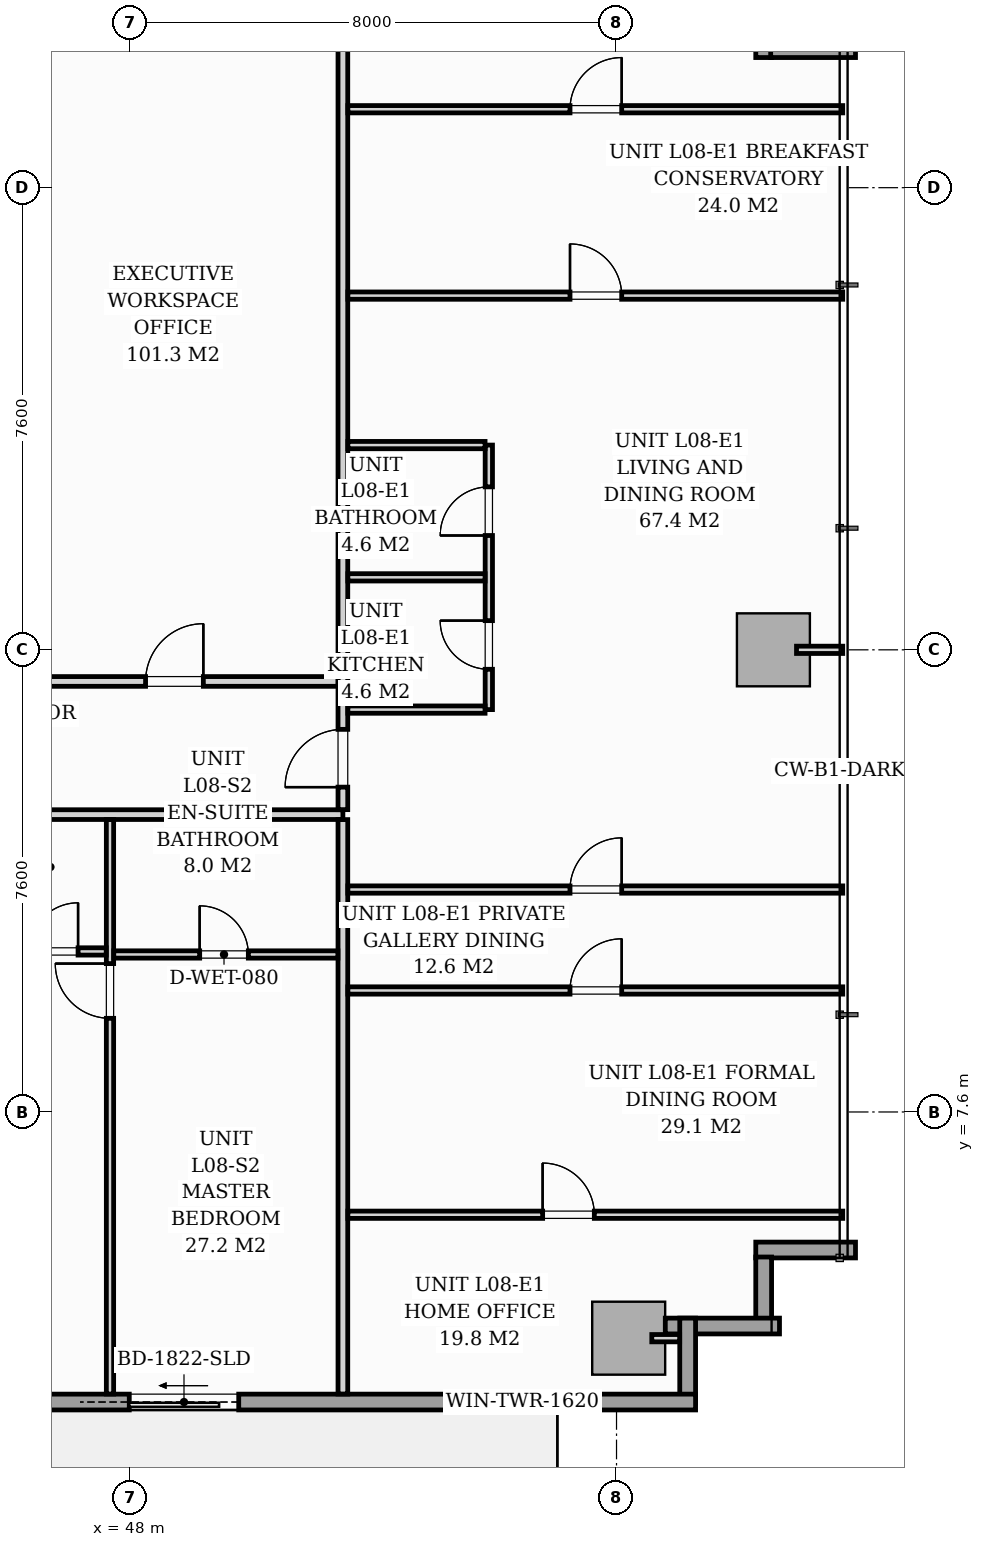
"""IFC4 building model, lengths in metres.
Left out: names, types, materials, properties, quantities, classifications, styles, units other than length and angle.
Written with IfcOpenShell. Run it as: python <this file> out.ifc"""

import sys

from ifc_helpers import new_model, si_unit, direction, frame, frame_2d, origin, origin_2d, place, context, subcontext, project, spatial, rectangle, extrude, source, transform, mapped, element, fill, save


model = new_model("IFC4")
c1 = context("Model", 3, precision=1e-05, world=origin(), true_north=direction((0.0, 1.0)))
c2 = subcontext(c1, "Body", "Model", "MODEL_VIEW")
j1 = project(units=[si_unit("LENGTHUNIT", "METRE"), si_unit("PLANEANGLEUNIT", "RADIAN")], contexts=[c1])
p1 = place(None, origin())
s1 = spatial("IfcSite", under=j1, at=p1, CompositionType="ELEMENT")
p2 = place(p1, origin())
s2 = spatial("IfcBuilding", under=s1, at=p2, CompositionType="ELEMENT")
p3 = place(p2, frame((0.0, 0.0, 32.6)))
s3 = spatial("IfcBuildingStorey", under=s2, at=p3, CompositionType="ELEMENT", Elevation=32.6)
m1 = source(origin(), c2, "Body", "SweptSolid", [
    extrude(rectangle(XDim=1.2, YDim=1.2, at=origin_2d()), origin(), (0.0, 0.0, 1.0), 3.196),
])
for number, where, z_axis, x_axis in (
    (1, (56.2, 3.88, 0.002), (0.0, 0.0, 1.0), (1.0, 0.0, 0.0)),
    (2, (58.58, 15.2, 0.002), (0.0, 0.0, 1.0), (1.0, 0.0, 0.0)),
):
    element("IfcColumn", number, at=place(p3, frame(where, z_axis=z_axis, x_axis=x_axis)), inside=s3, PredefinedType="COLUMN", context=c2, shape_type="MappedRepresentation", body=[
        mapped(m1, transform((0.0, 0.0, 0.0), scale=1.0)),
    ])
for number, where, z_axis, x_axis in (
    (3, (58.42, 26.335, 0.0), (0.0, 0.0, 1.0), (0.0, -1.0, 0.0)),
    (4, (58.535, 25.07, 0.0), (0.0, 0.0, 1.0), (1.0, 0.0, 0.0)),
):
    element("IfcWall", number, at=place(p3, frame(where, z_axis=z_axis, x_axis=x_axis)), inside=s3, PredefinedType="STANDARD", context=c2, shape_type="SweptSolid", body=[
        extrude(rectangle(XDim=1.395, YDim=0.26, at=frame_2d((0.698, 0.0))), origin(), (0.0, 0.0, 1.0), 2.94),
    ])
p4 = place(p3, frame((59.93, 5.33, 0.0), z_axis=(0.0, 0.0, 1.0), x_axis=(-1.0, 0.0, 0.0)))
e5 = element("IfcWall", 5, at=p4, inside=s3, PredefinedType="STANDARD", context=c2, shape_type="SweptSolid", body=[
    extrude(rectangle(XDim=1.64, YDim=0.26, at=frame_2d((0.82, 0.0))), origin(), (0.0, 0.0, 1.0), 2.94),
])
p5 = place(p3, frame((58.42, 5.215, 0.0), z_axis=(0.0, 0.0, 1.0), x_axis=(0.0, -1.0, 0.0)))
e6 = element("IfcWall", 6, at=p5, inside=s3, PredefinedType="STANDARD", context=c2, shape_type="SweptSolid", body=[
    extrude(rectangle(XDim=1.15, YDim=0.26, at=frame_2d((0.575, 0.0))), origin(), (0.0, 0.0, 1.0), 2.94),
])
p6 = place(p3, frame((58.68, 4.08, 0.0), z_axis=(0.0, 0.0, 1.0), x_axis=(-1.0, 0.0, 0.0)))
e7 = element("IfcWall", 7, at=p6, inside=s3, PredefinedType="STANDARD", context=c2, shape_type="SweptSolid", body=[
    extrude(rectangle(XDim=1.878, YDim=0.26, at=frame_2d((0.939, 0.0))), origin(), (0.0, 0.0, 1.0), 2.94),
])
p7 = place(p3, frame((57.17, 4.21, 0.0), z_axis=(0.0, 0.0, 1.0), x_axis=(0.0, -1.0, 0.0)))
e8 = element("IfcWall", 8, at=p7, inside=s3, PredefinedType="STANDARD", context=c2, shape_type="SweptSolid", body=[
    extrude(rectangle(XDim=1.395, YDim=0.26, at=frame_2d((0.698, 0.0))), origin(), (0.0, 0.0, 1.0), 2.94),
])
p8 = place(p3, frame((57.3, 2.83, 0.0), z_axis=(0.0, 0.0, 1.0), x_axis=(-1.0, 0.0, 0.0)))
e9 = element("IfcWall", 9, at=p8, inside=s3, PredefinedType="STANDARD", context=c2, shape_type="SweptSolid", body=[
    extrude(rectangle(XDim=17.15, YDim=0.26, at=frame_2d((8.575, 0.0))), origin(), (0.0, 0.0, 1.0), 2.94),
])
p9 = place(p8, frame((7.513, 0.0, 0.0)))
e10 = element("IfcOpeningElement", 10, at=p9, cuts=e9, PredefinedType="OPENING", context=c2, shape_type="SweptSolid", body=[
    extrude(rectangle(XDim=1.8, YDim=2.06, at=frame_2d((0.9, 1.03))), frame((0.0, 0.14, 0.0), z_axis=(0.0, -1.0, 0.0), x_axis=(1.0, 0.0, 0.0)), (0.0, 0.0, 1.0), 0.28),
])
p10 = place(p8, frame((2.05, 0.0, 0.65)))
e11 = element("IfcOpeningElement", 11, at=p10, cuts=e9, PredefinedType="OPENING", context=c2, shape_type="SweptSolid", body=[
    extrude(rectangle(XDim=1.6, YDim=1.5, at=frame_2d((0.8, 0.75))), frame((0.0, 0.14, 0.0), z_axis=(0.0, -1.0, 0.0), x_axis=(1.0, 0.0, 0.0)), (0.0, 0.0, 1.0), 0.28),
])
p11 = place(p3, frame((16.3, 12.49, 0.0), z_axis=(0.0, 0.0, 1.0), x_axis=(1.0, 0.0, 0.0)))
e12 = element("IfcWall", 12, at=p11, inside=s3, PredefinedType="PARTITIONING", context=c2, shape_type="SweptSolid", body=[
    extrude(rectangle(XDim=35.2, YDim=0.16, at=frame_2d((17.6, 0.0))), origin(), (0.0, 0.0, 1.0), 2.94),
])
p12 = place(p11, frame((11.072, 0.0, 0.0)))
e13 = element("IfcOpeningElement", 13, at=p12, cuts=e12, PredefinedType="OPENING", context=c2, shape_type="SweptSolid", body=[
    extrude(rectangle(XDim=0.95, YDim=2.06, at=frame_2d((0.475, 1.03))), frame((0.0, 0.09, 0.0), z_axis=(0.0, -1.0, 0.0), x_axis=(1.0, 0.0, 0.0)), (0.0, 0.0, 1.0), 0.18),
])
p13 = place(p11, frame((24.032, 0.0, 0.0)))
e14 = element("IfcOpeningElement", 14, at=p13, cuts=e12, PredefinedType="OPENING", context=c2, shape_type="SweptSolid", body=[
    extrude(rectangle(XDim=0.95, YDim=2.06, at=frame_2d((0.475, 1.03))), frame((0.0, 0.09, 0.0), z_axis=(0.0, -1.0, 0.0), x_axis=(1.0, 0.0, 0.0)), (0.0, 0.0, 1.0), 0.18),
])
p14 = place(p3, frame((51.5, 2.962, 0.0), z_axis=(0.0, 0.0, 1.0), x_axis=(0.0, 1.0, 0.0)))
e15 = element("IfcWall", 15, at=p14, inside=s3, PredefinedType="PARTITIONING", context=c2, shape_type="SweptSolid", body=[
    extrude(rectangle(XDim=9.446, YDim=0.16, at=frame_2d((4.723, 0.0))), origin(), (0.0, 0.0, 1.0), 2.94),
])
p15 = place(p3, frame((51.5, 12.572, 0.0), z_axis=(0.0, 0.0, 1.0), x_axis=(0.0, 1.0, 0.0)))
e16 = element("IfcWall", 16, at=p15, inside=s3, PredefinedType="PARTITIONING", context=c2, shape_type="SweptSolid", body=[
    extrude(rectangle(XDim=14.866, YDim=0.16, at=frame_2d((7.433, 0.0))), origin(), (0.0, 0.0, 1.0), 2.94),
])
p16 = place(p15, frame((0.37, 0.0, 0.0)))
e17 = element("IfcOpeningElement", 17, at=p16, cuts=e16, PredefinedType="OPENING", context=c2, shape_type="SweptSolid", body=[
    extrude(rectangle(XDim=0.95, YDim=2.06, at=frame_2d((0.475, 1.03))), frame((0.0, 0.09, 0.0), z_axis=(0.0, -1.0, 0.0), x_axis=(1.0, 0.0, 0.0)), (0.0, 0.0, 1.0), 0.18),
])
p17 = place(p3, frame((47.67, 2.962, 0.0), z_axis=(0.0, 0.0, 1.0), x_axis=(0.0, 1.0, 0.0)))
e18 = element("IfcWall", 18, at=p17, inside=s3, PredefinedType="PARTITIONING", context=c2, shape_type="SweptSolid", body=[
    extrude(rectangle(XDim=9.446, YDim=0.12, at=frame_2d((4.723, 0.0))), origin(), (0.0, 0.0, 1.0), 2.94),
])
p18 = place(p17, frame((6.178, 0.0, 0.0)))
e19 = element("IfcOpeningElement", 19, at=p18, cuts=e18, PredefinedType="OPENING", context=c2, shape_type="SweptSolid", body=[
    extrude(rectangle(XDim=0.9, YDim=2.05, at=frame_2d((0.45, 1.025))), frame((0.0, 0.07, 0.0), z_axis=(0.0, -1.0, 0.0), x_axis=(1.0, 0.0, 0.0)), (0.0, 0.0, 1.0), 0.14),
])
p19 = place(p3, frame((43.72, 10.24, 0.0), z_axis=(0.0, 0.0, 1.0), x_axis=(1.0, 0.0, 0.0)))
e20 = element("IfcWall", 20, at=p19, inside=s3, PredefinedType="PARTITIONING", context=c2, shape_type="SweptSolid", body=[
    extrude(rectangle(XDim=3.888, YDim=0.12, at=frame_2d((1.944, 0.0))), origin(), (0.0, 0.0, 1.0), 2.94),
])
p20 = place(p19, frame((0.625, 0.0, 0.0)))
e21 = element("IfcOpeningElement", 21, at=p20, cuts=e20, PredefinedType="OPENING", context=c2, shape_type="SweptSolid", body=[
    extrude(rectangle(XDim=0.85, YDim=2.05, at=frame_2d((0.425, 1.025))), frame((0.0, 0.07, 0.0), z_axis=(0.0, -1.0, 0.0), x_axis=(1.0, 0.0, 0.0)), (0.0, 0.0, 1.0), 0.14),
])
p21 = place(p19, frame((2.625, 0.0, 0.0)))
e22 = element("IfcOpeningElement", 22, at=p21, cuts=e20, PredefinedType="OPENING", context=c2, shape_type="SweptSolid", body=[
    extrude(rectangle(XDim=0.8, YDim=2.02, at=frame_2d((0.4, 1.01))), frame((0.0, 0.07, 0.0), z_axis=(0.0, -1.0, 0.0), x_axis=(1.0, 0.0, 0.0)), (0.0, 0.0, 1.0), 0.14),
])
p22 = place(p3, frame((47.732, 10.19, 0.0), z_axis=(0.0, 0.0, 1.0), x_axis=(1.0, 0.0, 0.0)))
e23 = element("IfcWall", 23, at=p22, inside=s3, PredefinedType="PARTITIONING", context=c2, shape_type="SweptSolid", body=[
    extrude(rectangle(XDim=3.686, YDim=0.12, at=frame_2d((1.843, 0.0))), origin(), (0.0, 0.0, 1.0), 2.94),
])
p23 = place(p22, frame((1.413, 0.0, 0.0)))
e24 = element("IfcOpeningElement", 24, at=p23, cuts=e23, PredefinedType="OPENING", context=c2, shape_type="SweptSolid", body=[
    extrude(rectangle(XDim=0.8, YDim=2.02, at=frame_2d((0.4, 1.01))), frame((0.0, 0.07, 0.0), z_axis=(0.0, -1.0, 0.0), x_axis=(1.0, 0.0, 0.0)), (0.0, 0.0, 1.0), 0.14),
])
p24 = place(p3, frame((53.9, 14.217, 0.0), z_axis=(0.0, 0.0, 1.0), x_axis=(0.0, 1.0, 0.0)))
e25 = element("IfcWall", 25, at=p24, inside=s3, PredefinedType="PARTITIONING", context=c2, shape_type="SweptSolid", body=[
    extrude(rectangle(XDim=4.35, YDim=0.12, at=frame_2d((2.175, 0.0))), origin(), (0.0, 0.0, 1.0), 2.94),
])
p25 = place(p24, frame((0.663, 0.0, 0.0)))
e26 = element("IfcOpeningElement", 26, at=p25, cuts=e25, PredefinedType="OPENING", context=c2, shape_type="SweptSolid", body=[
    extrude(rectangle(XDim=0.8, YDim=2.0, at=frame_2d((0.4, 1.0))), frame((0.0, 0.07, 0.0), z_axis=(0.0, -1.0, 0.0), x_axis=(1.0, 0.0, 0.0)), (0.0, 0.0, 1.0), 0.14),
])
p26 = place(p24, frame((2.863, 0.0, 0.0)))
e27 = element("IfcOpeningElement", 27, at=p26, cuts=e25, PredefinedType="OPENING", context=c2, shape_type="SweptSolid", body=[
    extrude(rectangle(XDim=0.8, YDim=2.02, at=frame_2d((0.4, 1.01))), frame((0.0, 0.07, 0.0), z_axis=(0.0, -1.0, 0.0), x_axis=(1.0, 0.0, 0.0)), (0.0, 0.0, 1.0), 0.14),
])
p27 = place(p3, frame((51.582, 16.392, 0.0), z_axis=(0.0, 0.0, 1.0), x_axis=(1.0, 0.0, 0.0)))
e28 = element("IfcWall", 28, at=p27, inside=s3, PredefinedType="PARTITIONING", context=c2, shape_type="SweptSolid", body=[
    extrude(rectangle(XDim=2.256, YDim=0.12, at=frame_2d((1.128, 0.0))), origin(), (0.0, 0.0, 1.0), 2.045),
])
for number, where, z_axis, x_axis in (
    (29, (51.582, 14.217, 0.0), (0.0, 0.0, 1.0), (1.0, 0.0, 0.0)),
    (30, (51.582, 18.567, 0.0), (0.0, 0.0, 1.0), (1.0, 0.0, 0.0)),
):
    element("IfcWall", number, at=place(p3, frame(where, z_axis=z_axis, x_axis=x_axis)), inside=s3, PredefinedType="PARTITIONING", context=c2, shape_type="SweptSolid", body=[
        extrude(rectangle(XDim=2.256, YDim=0.12, at=frame_2d((1.128, 0.0))), origin(), (0.0, 0.0, 1.0), 2.94),
    ])
p28 = place(p3, frame((51.582, 24.09, 0.0), z_axis=(0.0, 0.0, 1.0), x_axis=(1.0, 0.0, 0.0)))
e31 = element("IfcWall", 31, at=p28, inside=s3, PredefinedType="PARTITIONING", context=c2, shape_type="SweptSolid", body=[
    extrude(rectangle(XDim=8.138, YDim=0.12, at=frame_2d((4.069, 0.0))), origin(), (0.0, 0.0, 1.0), 2.94),
])
p29 = place(p28, frame((3.653, 0.0, 0.0)))
e32 = element("IfcOpeningElement", 32, at=p29, cuts=e31, PredefinedType="OPENING", context=c2, shape_type="SweptSolid", body=[
    extrude(rectangle(XDim=0.85, YDim=2.05, at=frame_2d((0.425, 1.025))), frame((0.0, 0.07, 0.0), z_axis=(0.0, -1.0, 0.0), x_axis=(1.0, 0.0, 0.0)), (0.0, 0.0, 1.0), 0.14),
])
p30 = place(p3, frame((51.582, 5.91, 0.0), z_axis=(0.0, 0.0, 1.0), x_axis=(1.0, 0.0, 0.0)))
e33 = element("IfcWall", 33, at=p30, inside=s3, PredefinedType="PARTITIONING", context=c2, shape_type="SweptSolid", body=[
    extrude(rectangle(XDim=8.138, YDim=0.12, at=frame_2d((4.069, 0.0))), origin(), (0.0, 0.0, 1.0), 2.94),
])
p31 = place(p30, frame((3.203, 0.0, 0.0)))
e34 = element("IfcOpeningElement", 34, at=p31, cuts=e33, PredefinedType="OPENING", context=c2, shape_type="SweptSolid", body=[
    extrude(rectangle(XDim=0.85, YDim=2.05, at=frame_2d((0.425, 1.025))), frame((0.0, 0.07, 0.0), z_axis=(0.0, -1.0, 0.0), x_axis=(1.0, 0.0, 0.0)), (0.0, 0.0, 1.0), 0.14),
])
p32 = place(p3, frame((51.582, 9.598, 0.0), z_axis=(0.0, 0.0, 1.0), x_axis=(1.0, 0.0, 0.0)))
e35 = element("IfcWall", 35, at=p32, inside=s3, PredefinedType="PARTITIONING", context=c2, shape_type="SweptSolid", body=[
    extrude(rectangle(XDim=8.138, YDim=0.12, at=frame_2d((4.069, 0.0))), origin(), (0.0, 0.0, 1.0), 2.94),
])
p33 = place(p32, frame((3.653, 0.0, 0.0)))
e36 = element("IfcOpeningElement", 36, at=p33, cuts=e35, PredefinedType="OPENING", context=c2, shape_type="SweptSolid", body=[
    extrude(rectangle(XDim=0.85, YDim=2.05, at=frame_2d((0.425, 1.025))), frame((0.0, 0.07, 0.0), z_axis=(0.0, -1.0, 0.0), x_axis=(1.0, 0.0, 0.0)), (0.0, 0.0, 1.0), 0.14),
])
p34 = place(p3, frame((51.582, 21.025, 0.0), z_axis=(0.0, 0.0, 1.0), x_axis=(1.0, 0.0, 0.0)))
e37 = element("IfcWall", 37, at=p34, inside=s3, PredefinedType="PARTITIONING", context=c2, shape_type="SweptSolid", body=[
    extrude(rectangle(XDim=8.138, YDim=0.12, at=frame_2d((4.069, 0.0))), origin(), (0.0, 0.0, 1.0), 2.94),
])
p35 = place(p34, frame((3.653, 0.0, 0.0)))
e38 = element("IfcOpeningElement", 38, at=p35, cuts=e37, PredefinedType="OPENING", context=c2, shape_type="SweptSolid", body=[
    extrude(rectangle(XDim=0.85, YDim=2.05, at=frame_2d((0.425, 1.025))), frame((0.0, 0.07, 0.0), z_axis=(0.0, -1.0, 0.0), x_axis=(1.0, 0.0, 0.0)), (0.0, 0.0, 1.0), 0.14),
])
p36 = place(p3, frame((51.582, 11.258, 0.0), z_axis=(0.0, 0.0, 1.0), x_axis=(1.0, 0.0, 0.0)))
e39 = element("IfcWall", 39, at=p36, inside=s3, PredefinedType="PARTITIONING", context=c2, shape_type="SweptSolid", body=[
    extrude(rectangle(XDim=8.138, YDim=0.12, at=frame_2d((4.069, 0.0))), origin(), (0.0, 0.0, 1.0), 2.94),
])
p37 = place(p36, frame((3.653, 0.0, 0.0)))
e40 = element("IfcOpeningElement", 40, at=p37, cuts=e39, PredefinedType="OPENING", context=c2, shape_type="SweptSolid", body=[
    extrude(rectangle(XDim=0.85, YDim=2.05, at=frame_2d((0.425, 1.025))), frame((0.0, 0.07, 0.0), z_axis=(0.0, -1.0, 0.0), x_axis=(1.0, 0.0, 0.0)), (0.0, 0.0, 1.0), 0.14),
])
p38 = place(p3, frame((45.84, 14.68, 0.0), z_axis=(0.0, 0.0, 1.0), x_axis=(1.0, 0.0, 0.0)))
e41 = element("IfcWall", 41, at=p38, inside=s3, PredefinedType="PARTITIONING", context=c2, shape_type="SweptSolid", body=[
    extrude(rectangle(XDim=5.578, YDim=0.16, at=frame_2d((2.789, 0.0))), origin(), (0.0, 0.0, 1.0), 2.94),
])
p39 = place(p38, frame((2.415, 0.0, 0.0)))
e42 = element("IfcOpeningElement", 42, at=p39, cuts=e41, PredefinedType="OPENING", context=c2, shape_type="SweptSolid", body=[
    extrude(rectangle(XDim=0.95, YDim=2.06, at=frame_2d((0.475, 1.03))), frame((0.0, 0.09, 0.0), z_axis=(0.0, -1.0, 0.0), x_axis=(1.0, 0.0, 0.0)), (0.0, 0.0, 1.0), 0.18),
])
p40 = place(p3, frame((56.58, 3.88, 0.0), z_axis=(0.0, 0.0, 1.0), x_axis=(1.0, 0.0, 0.0)))
e43 = element("IfcWall", 43, at=p40, inside=s3, PredefinedType="PARTITIONING", context=c2, shape_type="SweptSolid", body=[
    extrude(rectangle(XDim=0.458, YDim=0.12, at=frame_2d((0.229, 0.0))), origin(), (0.0, 0.0, 1.0), 2.94),
])
p41 = place(p3, frame((58.96, 15.2, 0.0), z_axis=(0.0, 0.0, 1.0), x_axis=(1.0, 0.0, 0.0)))
e44 = element("IfcWall", 44, at=p41, inside=s3, PredefinedType="PARTITIONING", context=c2, shape_type="SweptSolid", body=[
    extrude(rectangle(XDim=0.76, YDim=0.12, at=frame_2d((0.38, 0.0))), origin(), (0.0, 0.0, 1.0), 2.94),
])
m2 = source(origin(), c2, "Body", "SweptSolid", [
    extrude(rectangle(XDim=1.8, YDim=2.06, at=frame_2d((0.9, 1.03))), frame((0.0, 0.025, 0.0), z_axis=(0.0, -1.0, 0.0), x_axis=(1.0, 0.0, 0.0)), (0.0, 0.0, 1.0), 0.05),
])
p42 = place(p9, origin())
e45 = element("IfcDoor", 45, at=p42, inside=s3, OperationType="SLIDING_TO_RIGHT", PredefinedType="DOOR", context=c2, shape_type="MappedRepresentation", body=[
    mapped(m2, transform((0.0, 0.0, 0.0), scale=1.0)),
])
fill(e10, e45)
m3 = source(origin(), c2, "Body", "SweptSolid", [
    extrude(rectangle(XDim=1.6, YDim=1.5, at=frame_2d((0.8, 0.75))), frame((0.0, 0.03, 0.0), z_axis=(0.0, -1.0, 0.0), x_axis=(1.0, 0.0, 0.0)), (0.0, 0.0, 1.0), 0.06),
])
p43 = place(p10, origin())
e46 = element("IfcWindow", 46, at=p43, inside=s3, PartitioningType="SINGLE_PANEL", PredefinedType="WINDOW", context=c2, shape_type="MappedRepresentation", body=[
    mapped(m3, transform((0.0, 0.0, 0.0), scale=1.0)),
])
fill(e11, e46)
m4 = source(origin(), c2, "Body", "SweptSolid", [
    extrude(rectangle(XDim=0.8, YDim=2.02, at=frame_2d((0.4, 1.01))), frame((0.0, 0.025, 0.0), z_axis=(0.0, -1.0, 0.0), x_axis=(1.0, 0.0, 0.0)), (0.0, 0.0, 1.0), 0.05),
])
p44 = place(p23, origin())
e47 = element("IfcDoor", 47, at=p44, inside=s3, OperationType="SINGLE_SWING_LEFT", PredefinedType="DOOR", context=c2, shape_type="MappedRepresentation", body=[
    mapped(m4, transform((0.0, 0.0, 0.0), scale=1.0)),
])
fill(e24, e47)
m5 = source(origin(), c2, "Body", "SweptSolid", [
    extrude(rectangle(XDim=0.9, YDim=2.05, at=frame_2d((0.45, 1.025))), frame((0.0, 0.025, 0.0), z_axis=(0.0, -1.0, 0.0), x_axis=(1.0, 0.0, 0.0)), (0.0, 0.0, 1.0), 0.05),
])
p45 = place(p18, origin())
e48 = element("IfcDoor", 48, at=p45, inside=s3, OperationType="SINGLE_SWING_RIGHT", PredefinedType="DOOR", context=c2, shape_type="MappedRepresentation", body=[
    mapped(m5, transform((0.0, 0.0, 0.0), scale=1.0)),
])
fill(e19, e48)
p46 = place(p21, origin())
e49 = element("IfcDoor", 49, at=p46, inside=s3, OperationType="SINGLE_SWING_RIGHT", PredefinedType="DOOR", context=c2, shape_type="MappedRepresentation", body=[
    mapped(m4, transform((0.0, 0.0, 0.0), scale=1.0)),
])
fill(e22, e49)
m6 = source(origin(), c2, "Body", "SweptSolid", [
    extrude(rectangle(XDim=0.95, YDim=2.06, at=frame_2d((0.475, 1.03))), frame((0.0, 0.025, 0.0), z_axis=(0.0, -1.0, 0.0), x_axis=(1.0, 0.0, 0.0)), (0.0, 0.0, 1.0), 0.05),
])
p47 = place(p16, origin())
e50 = element("IfcDoor", 50, at=p47, inside=s3, OperationType="SINGLE_SWING_LEFT", PredefinedType="DOOR", context=c2, shape_type="MappedRepresentation", body=[
    mapped(m6, transform((0.0, 0.0, 0.0), scale=1.0)),
])
fill(e17, e50)
m7 = source(origin(), c2, "Body", "SweptSolid", [
    extrude(rectangle(XDim=0.8, YDim=2.0, at=frame_2d((0.4, 1.0))), frame((0.0, 0.025, 0.0), z_axis=(0.0, -1.0, 0.0), x_axis=(1.0, 0.0, 0.0)), (0.0, 0.0, 1.0), 0.05),
])
p48 = place(p25, origin())
e51 = element("IfcDoor", 51, at=p48, inside=s3, OperationType="SINGLE_SWING_RIGHT", PredefinedType="DOOR", context=c2, shape_type="MappedRepresentation", body=[
    mapped(m7, transform((0.0, 0.0, 0.0), scale=1.0)),
])
fill(e26, e51)
p49 = place(p26, origin())
e52 = element("IfcDoor", 52, at=p49, inside=s3, OperationType="SINGLE_SWING_LEFT", PredefinedType="DOOR", context=c2, shape_type="MappedRepresentation", body=[
    mapped(m4, transform((0.0, 0.0, 0.0), scale=1.0)),
])
fill(e27, e52)
m8 = source(origin(), c2, "Body", "SweptSolid", [
    extrude(rectangle(XDim=0.85, YDim=2.05, at=frame_2d((0.425, 1.025))), frame((0.0, 0.025, 0.0), z_axis=(0.0, -1.0, 0.0), x_axis=(1.0, 0.0, 0.0)), (0.0, 0.0, 1.0), 0.05),
])
p50 = place(p29, origin())
e53 = element("IfcDoor", 53, at=p50, inside=s3, OperationType="SINGLE_SWING_RIGHT", PredefinedType="DOOR", context=c2, shape_type="MappedRepresentation", body=[
    mapped(m8, transform((0.0, 0.0, 0.0), scale=1.0)),
])
fill(e32, e53)
p51 = place(p31, origin())
e54 = element("IfcDoor", 54, at=p51, inside=s3, OperationType="SINGLE_SWING_LEFT", PredefinedType="DOOR", context=c2, shape_type="MappedRepresentation", body=[
    mapped(m8, transform((0.0, 0.0, 0.0), scale=1.0)),
])
fill(e34, e54)
p52 = place(p33, origin())
e55 = element("IfcDoor", 55, at=p52, inside=s3, OperationType="SINGLE_SWING_RIGHT", PredefinedType="DOOR", context=c2, shape_type="MappedRepresentation", body=[
    mapped(m8, transform((0.0, 0.0, 0.0), scale=1.0)),
])
fill(e36, e55)
p53 = place(p35, origin())
e56 = element("IfcDoor", 56, at=p53, inside=s3, OperationType="SINGLE_SWING_LEFT", PredefinedType="DOOR", context=c2, shape_type="MappedRepresentation", body=[
    mapped(m8, transform((0.0, 0.0, 0.0), scale=1.0)),
])
fill(e38, e56)
p54 = place(p37, origin())
e57 = element("IfcDoor", 57, at=p54, inside=s3, OperationType="SINGLE_SWING_RIGHT", PredefinedType="DOOR", context=c2, shape_type="MappedRepresentation", body=[
    mapped(m8, transform((0.0, 0.0, 0.0), scale=1.0)),
])
fill(e40, e57)
p55 = place(p39, origin())
e58 = element("IfcDoor", 58, at=p55, inside=s3, OperationType="SINGLE_SWING_RIGHT", PredefinedType="DOOR", context=c2, shape_type="MappedRepresentation", body=[
    mapped(m6, transform((0.0, 0.0, 0.0), scale=1.0)),
])
fill(e42, e58)
save(model, sys.argv[1])
